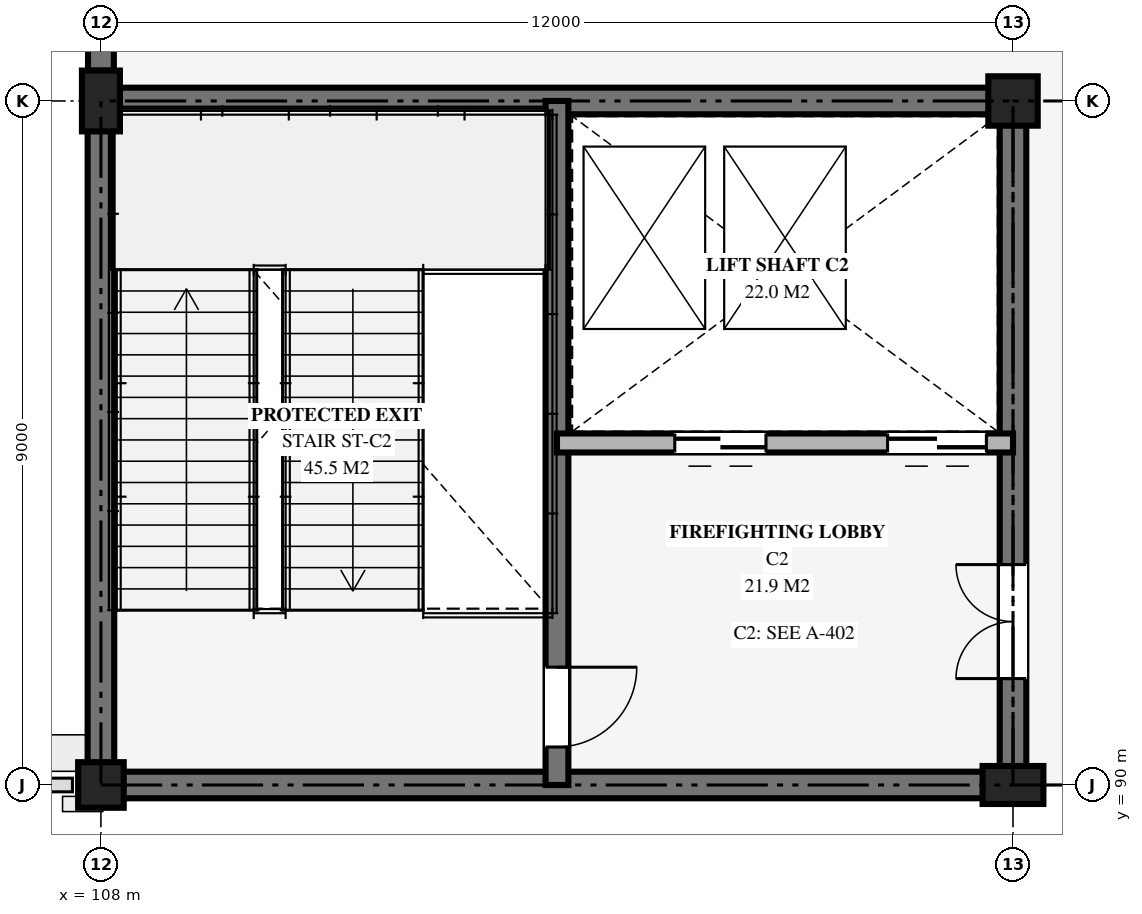
"""IFC4 building model, lengths in metres.
Left out: names, types, materials, properties, quantities, classifications, styles, units other than length and angle.
Written with IfcOpenShell. Run it as: python <this file> out.ifc"""

import sys

from ifc_helpers import new_model, si_unit, direction, frame, frame_2d, origin, origin_2d, place, context, subcontext, project, spatial, rectangle, circle, extrude, element, fill, save


model = new_model("IFC4")
c1 = context("Model", 3, precision=1e-05, world=origin(), true_north=direction((0.0, 1.0)))
c2 = subcontext(c1, "Body", "Model", "MODEL_VIEW")
j1 = project(units=[si_unit("LENGTHUNIT", "METRE"), si_unit("PLANEANGLEUNIT", "RADIAN")], contexts=[c1])
p1 = place(None, origin())
s1 = spatial("IfcSite", under=j1, at=p1, CompositionType="ELEMENT")
p2 = place(p1, origin())
s2 = spatial("IfcBuilding", under=s1, at=p2, CompositionType="ELEMENT")
p3 = place(p2, frame((0.0, 0.0, 10.2)))
s3 = spatial("IfcBuildingStorey", under=s2, at=p3, CompositionType="ELEMENT", Elevation=10.2)
p4 = place(p3, frame((108.0, 90.0, 0.0), z_axis=(0.0, 0.0, 1.0), x_axis=(1.0, 0.0, 0.0)))
e1 = element("IfcColumn", 1, at=p4, inside=s3, PredefinedType="COLUMN", context=c2, shape_type="SweptSolid", body=[
    extrude(circle(Radius=0.3, at=origin_2d()), origin(), (0.0, 0.0, 1.0), 4.64),
])
for number, where, z_axis, x_axis in (
    (2, (108.0, 99.0, 0.0), (0.0, 0.0, 1.0), (1.0, 0.0, 0.0)),
    (3, (120.0, 90.0, 0.0), (0.0, 0.0, 1.0), (0.0, 1.0, 0.0)),
):
    element("IfcColumn", number, at=place(p3, frame(where, z_axis=z_axis, x_axis=x_axis)), inside=s3, PredefinedType="PILASTER", context=c2, shape_type="SweptSolid", body=[
        extrude(rectangle(XDim=0.5, YDim=0.8, at=origin_2d()), origin(), (0.0, 0.0, 1.0), 4.64),
    ])
p5 = place(p3, frame((120.0, 99.0, 0.0), z_axis=(0.0, 0.0, 1.0), x_axis=(1.0, 0.0, 0.0)))
e4 = element("IfcColumn", 4, at=p5, inside=s3, PredefinedType="COLUMN", context=c2, shape_type="SweptSolid", body=[
    extrude(rectangle(XDim=0.65, YDim=0.65, at=origin_2d()), origin(), (0.0, 0.0, 1.0), 4.64),
])
p6 = place(p3, frame((108.0, 107.6, 0.0), z_axis=(0.0, 0.0, 1.0), x_axis=(0.0, -1.0, 0.0)))
e5 = element("IfcWall", 5, at=p6, inside=s3, PredefinedType="SOLIDWALL", context=c2, shape_type="SweptSolid", body=[
    extrude(rectangle(XDim=8.2, YDim=0.34, at=frame_2d((4.1, 0.0))), origin(), (0.0, 0.0, 1.0), 4.52),
])
p7 = place(p6, frame((3.275, 0.0, 1.0)))
e6 = element("IfcOpeningElement", 6, at=p7, cuts=e5, PredefinedType="OPENING", context=c2, shape_type="SweptSolid", body=[
    extrude(rectangle(XDim=1.65, YDim=1.35, at=frame_2d((0.825, 0.675))), frame((0.0, 0.18, 0.0), z_axis=(0.0, -1.0, 0.0), x_axis=(1.0, 0.0, 0.0)), (0.0, 0.0, 1.0), 0.36),
])
for number, where, z_axis, x_axis in (
    (7, (108.0, 90.0, 0.0), (0.0, 0.0, 1.0), (1.0, 0.0, 0.0)),
    (8, (108.0, 99.0, 0.0), (0.0, 0.0, 1.0), (1.0, 0.0, 0.0)),
):
    element("IfcWall", number, at=place(p3, frame(where, z_axis=z_axis, x_axis=x_axis)), inside=s3, PredefinedType="SHEAR", context=c2, shape_type="SweptSolid", body=[
        extrude(rectangle(XDim=12.0, YDim=0.35, at=frame_2d((6.0, 0.0))), origin(), (0.0, 0.0, 1.0), 4.78),
    ])
p8 = place(p3, frame((108.0, 90.0, 0.0), z_axis=(0.0, 0.0, 1.0), x_axis=(0.0, 1.0, 0.0)))
e9 = element("IfcWall", 9, at=p8, inside=s3, PredefinedType="SHEAR", context=c2, shape_type="SweptSolid", body=[
    extrude(rectangle(XDim=9.0, YDim=0.35, at=frame_2d((4.5, 0.0))), origin(), (0.0, 0.0, 1.0), 4.78),
])
p9 = place(p3, frame((120.0, 90.0, 0.0), z_axis=(0.0, 0.0, 1.0), x_axis=(0.0, 1.0, 0.0)))
e10 = element("IfcWall", 10, at=p9, inside=s3, PredefinedType="SHEAR", context=c2, shape_type="SweptSolid", body=[
    extrude(rectangle(XDim=9.0, YDim=0.35, at=frame_2d((4.5, 0.0))), origin(), (0.0, 0.0, 1.0), 4.78),
])
p10 = place(p9, frame((1.4, 0.0, 0.0)))
e11 = element("IfcOpeningElement", 11, at=p10, cuts=e10, PredefinedType="OPENING", context=c2, shape_type="SweptSolid", body=[
    extrude(rectangle(XDim=1.5, YDim=2.2, at=frame_2d((0.75, 1.1))), frame((0.0, 0.185, 0.0), z_axis=(0.0, -1.0, 0.0), x_axis=(1.0, 0.0, 0.0)), (0.0, 0.0, 1.0), 0.37),
])
p11 = place(p3, frame((114.0, 99.0, 0.0), z_axis=(0.0, 0.0, 1.0), x_axis=(0.0, -1.0, 0.0)))
e12 = element("IfcWall", 12, at=p11, inside=s3, PredefinedType="SHEAR", context=c2, shape_type="SweptSolid", body=[
    extrude(rectangle(XDim=9.0, YDim=0.3, at=frame_2d((4.5, 0.0))), origin(), (0.0, 0.0, 1.0), 4.78),
])
p12 = place(p11, frame((7.45, 0.0, 0.0)))
e13 = element("IfcOpeningElement", 13, at=p12, cuts=e12, PredefinedType="OPENING", context=c2, shape_type="SweptSolid", body=[
    extrude(rectangle(XDim=1.05, YDim=2.15, at=frame_2d((0.525, 1.075))), frame((0.0, 0.16, 0.0), z_axis=(0.0, -1.0, 0.0), x_axis=(1.0, 0.0, 0.0)), (0.0, 0.0, 1.0), 0.32),
])
p13 = place(p3, frame((120.0, 94.5, 0.0), z_axis=(0.0, 0.0, 1.0), x_axis=(-1.0, 0.0, 0.0)))
e14 = element("IfcWall", 14, at=p13, inside=s3, PredefinedType="SOLIDWALL", context=c2, shape_type="SweptSolid", body=[
    extrude(rectangle(XDim=6.0, YDim=0.25, at=frame_2d((3.0, 0.0))), origin(), (0.0, 0.0, 1.0), 3.65),
])
p14 = place(p13, frame((0.35, 0.0, 0.0)))
e15 = element("IfcOpeningElement", 15, at=p14, cuts=e14, PredefinedType="OPENING", context=c2, shape_type="SweptSolid", body=[
    extrude(rectangle(XDim=1.3, YDim=2.25, at=frame_2d((0.65, 1.125))), frame((0.0, 0.135, 0.0), z_axis=(0.0, -1.0, 0.0), x_axis=(1.0, 0.0, 0.0)), (0.0, 0.0, 1.0), 0.27),
])
p15 = place(p13, frame((3.25, 0.0, 0.0)))
e16 = element("IfcOpeningElement", 16, at=p15, cuts=e14, PredefinedType="OPENING", context=c2, shape_type="SweptSolid", body=[
    extrude(rectangle(XDim=1.2, YDim=2.2, at=frame_2d((0.6, 1.1))), frame((0.0, 0.135, 0.0), z_axis=(0.0, -1.0, 0.0), x_axis=(1.0, 0.0, 0.0)), (0.0, 0.0, 1.0), 0.27),
])
p16 = place(p14, origin())
e17 = element("IfcDoor", 17, at=p16, inside=s3, OperationType="DOUBLE_DOOR_SLIDING", PredefinedType="USERDEFINED", context=c2, shape_type="SweptSolid", body=[
    extrude(rectangle(XDim=1.3, YDim=2.25, at=frame_2d((0.65, 1.125))), frame((0.0, 0.025, 0.0), z_axis=(0.0, -1.0, 0.0), x_axis=(1.0, 0.0, 0.0)), (0.0, 0.0, 1.0), 0.05),
])
fill(e15, e17)
p17 = place(p15, origin())
e18 = element("IfcDoor", 18, at=p17, inside=s3, OperationType="DOUBLE_DOOR_SLIDING", PredefinedType="USERDEFINED", context=c2, shape_type="SweptSolid", body=[
    extrude(rectangle(XDim=1.2, YDim=2.2, at=frame_2d((0.6, 1.1))), frame((0.0, 0.025, 0.0), z_axis=(0.0, -1.0, 0.0), x_axis=(1.0, 0.0, 0.0)), (0.0, 0.0, 1.0), 0.05),
])
fill(e16, e18)
p18 = place(p12, origin())
e19 = element("IfcDoor", 19, at=p18, inside=s3, OperationType="SINGLE_SWING_LEFT", PredefinedType="DOOR", context=c2, shape_type="SweptSolid", body=[
    extrude(rectangle(XDim=1.05, YDim=2.15, at=frame_2d((0.525, 1.075))), frame((0.0, 0.025, 0.0), z_axis=(0.0, -1.0, 0.0), x_axis=(1.0, 0.0, 0.0)), (0.0, 0.0, 1.0), 0.05),
])
fill(e13, e19)
p19 = place(p10, origin())
e20 = element("IfcDoor", 20, at=p19, inside=s3, OperationType="DOUBLE_DOOR_SINGLE_SWING", PredefinedType="DOOR", context=c2, shape_type="SweptSolid", body=[
    extrude(rectangle(XDim=1.5, YDim=2.2, at=frame_2d((0.75, 1.1))), frame((0.0, 0.025, 0.0), z_axis=(0.0, -1.0, 0.0), x_axis=(1.0, 0.0, 0.0)), (0.0, 0.0, 1.0), 0.05),
])
fill(e11, e20)
save(model, sys.argv[1])
